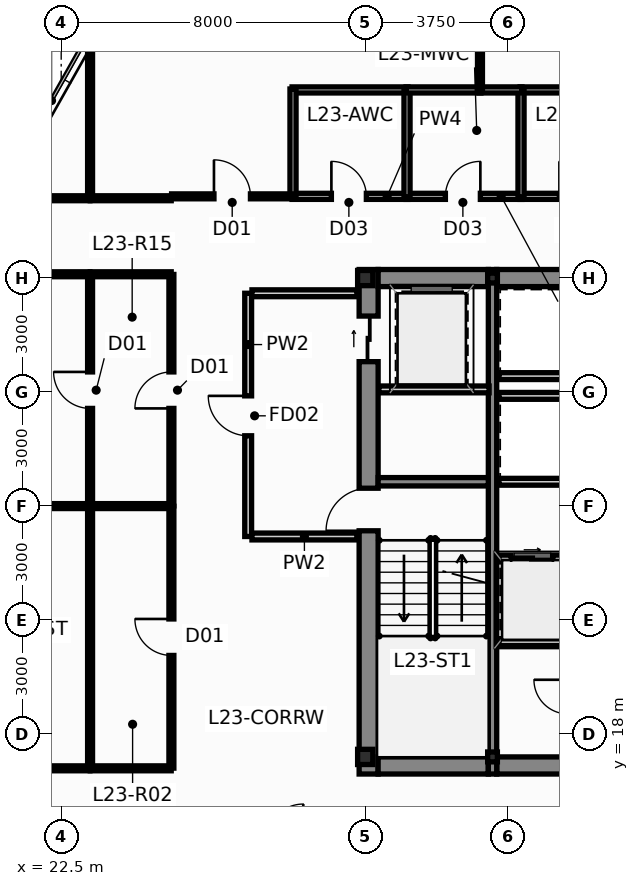
"""IFC4 building model, lengths in metres.
Left out: names, types, materials, properties, quantities, classifications, styles, units other than length and angle.
Written with IfcOpenShell. Run it as: python <this file> out.ifc"""

import sys

from ifc_helpers import new_model, si_unit, direction, frame, frame_2d, origin, origin_2d, place, context, subcontext, project, spatial, rectangle, i_section, extrude, source, transform, mapped, element, fill, save


model = new_model("IFC4")
c1 = context("Model", 3, precision=1e-05, world=origin(), true_north=direction((0.0, 1.0)))
c2 = subcontext(c1, "Body", "Model", "MODEL_VIEW")
j1 = project(units=[si_unit("LENGTHUNIT", "METRE"), si_unit("PLANEANGLEUNIT", "RADIAN")], contexts=[c1])
p1 = place(None, origin())
s1 = spatial("IfcSite", under=j1, at=p1, CompositionType="ELEMENT")
p2 = place(p1, origin())
s2 = spatial("IfcBuilding", under=s1, at=p2, CompositionType="ELEMENT")
p3 = place(p2, frame((0.0, 0.0, 90.8)))
s3 = spatial("IfcBuildingStorey", under=s2, at=p3, CompositionType="ELEMENT", Elevation=90.8)
m1 = source(origin(), c2, "Body", "SweptSolid", [
    extrude(i_section(OverallWidth=0.4, OverallDepth=0.4, WebThickness=0.02, FlangeThickness=0.032, at=origin_2d()), origin(), (0.0, 0.0, 1.0), 3.65),
])
for number, where, z_axis, x_axis in (
    (1, (30.5, 17.4, 0.0), (0.0, 0.0, 1.0), (1.0, 0.0, 0.0)),
    (2, (30.5, 30.0, 0.0), (0.0, 0.0, 1.0), (1.0, 0.0, 0.0)),
):
    element("IfcColumn", number, at=place(p3, frame(where, z_axis=z_axis, x_axis=x_axis)), inside=s3, PredefinedType="COLUMN", context=c2, shape_type="MappedRepresentation", body=[
        mapped(m1, transform((0.0, 0.0, 0.0), scale=1.0)),
    ])
m2 = source(origin(), c2, "Body", "SweptSolid", [
    extrude(i_section(OverallWidth=0.256, OverallDepth=0.26, WebThickness=0.01, FlangeThickness=0.017, at=origin_2d()), origin(), (0.0, 0.0, 1.0), 3.65),
])
for number, where, z_axis, x_axis in (
    (3, (33.85, 17.4, 0.0), (0.0, 0.0, 1.0), (1.0, 0.0, 0.0)),
    (4, (33.85, 30.0, 0.0), (0.0, 0.0, 1.0), (1.0, 0.0, 0.0)),
):
    element("IfcColumn", number, at=place(p3, frame(where, z_axis=z_axis, x_axis=x_axis)), inside=s3, PredefinedType="COLUMN", context=c2, shape_type="MappedRepresentation", body=[
        mapped(m2, transform((0.0, 0.0, 0.0), scale=1.0)),
    ])
p4 = place(p3, frame((30.59, 16.95, 0.0), z_axis=(0.0, 0.0, 1.0), x_axis=(0.0, 1.0, 0.0)))
e5 = element("IfcWall", 5, at=p4, inside=s3, PredefinedType="SHEAR", context=c2, shape_type="SweptSolid", body=[
    extrude(rectangle(XDim=13.275, YDim=0.5, at=frame_2d((6.638, 0.0))), origin(), (0.0, 0.0, 1.0), 3.65),
])
p5 = place(p4, frame((6.4, 0.0, 0.0)))
e6 = element("IfcOpeningElement", 6, at=p5, cuts=e5, PredefinedType="OPENING", context=c2, shape_type="SweptSolid", body=[
    extrude(rectangle(XDim=1.12, YDim=2.15, at=frame_2d((0.56, 1.075))), frame((0.0, 0.262, 0.0), z_axis=(0.0, -1.0, 0.0), x_axis=(1.0, 0.0, 0.0)), (0.0, 0.0, 1.0), 0.524),
])
p6 = place(p4, frame((10.85, 0.0, 0.0)))
e7 = element("IfcOpeningElement", 7, at=p6, cuts=e5, PredefinedType="OPENING", context=c2, shape_type="SweptSolid", body=[
    extrude(rectangle(XDim=1.2, YDim=2.2, at=frame_2d((0.6, 1.1))), frame((0.0, 0.262, 0.0), z_axis=(0.0, -1.0, 0.0), x_axis=(1.0, 0.0, 0.0)), (0.0, 0.0, 1.0), 0.524),
])
p7 = place(p3, frame((30.84, 17.175, 0.0), z_axis=(0.0, 0.0, 1.0), x_axis=(1.0, 0.0, 0.0)))
e8 = element("IfcWall", 8, at=p7, inside=s3, PredefinedType="SHEAR", context=c2, shape_type="SweptSolid", body=[
    extrude(rectangle(XDim=2.9, YDim=0.45, at=frame_2d((1.45, 0.0))), origin(), (0.0, 0.0, 1.0), 3.65),
])
p8 = place(p3, frame((33.96, 17.175, 0.0), z_axis=(0.0, 0.0, 1.0), x_axis=(1.0, 0.0, 0.0)))
e9 = element("IfcWall", 9, at=p8, inside=s3, PredefinedType="SHEAR", context=c2, shape_type="SweptSolid", body=[
    extrude(rectangle(XDim=8.08, YDim=0.45, at=frame_2d((4.04, 0.0))), origin(), (0.0, 0.0, 1.0), 3.65),
])
p9 = place(p3, frame((30.84, 30.0, 0.0), z_axis=(0.0, 0.0, 1.0), x_axis=(1.0, 0.0, 0.0)))
e10 = element("IfcWall", 10, at=p9, inside=s3, PredefinedType="SHEAR", context=c2, shape_type="SweptSolid", body=[
    extrude(rectangle(XDim=2.9, YDim=0.45, at=frame_2d((1.45, 0.0))), origin(), (0.0, 0.0, 1.0), 3.65),
])
p10 = place(p3, frame((33.96, 30.0, 0.0), z_axis=(0.0, 0.0, 1.0), x_axis=(1.0, 0.0, 0.0)))
e11 = element("IfcWall", 11, at=p10, inside=s3, PredefinedType="SHEAR", context=c2, shape_type="SweptSolid", body=[
    extrude(rectangle(XDim=3.78, YDim=0.45, at=frame_2d((1.89, 0.0))), origin(), (0.0, 0.0, 1.0), 3.65),
])
p11 = place(p3, frame((33.85, 16.95, 0.0), z_axis=(0.0, 0.0, 1.0), x_axis=(0.0, 1.0, 0.0)))
e12 = element("IfcWall", 12, at=p11, inside=s3, PredefinedType="SHEAR", context=c2, shape_type="SweptSolid", body=[
    extrude(rectangle(XDim=13.275, YDim=0.22, at=frame_2d((6.638, 0.0))), origin(), (0.0, 0.0, 1.0), 3.65),
])
p12 = place(p3, frame((30.84, 24.64, 0.0), z_axis=(0.0, 0.0, 1.0), x_axis=(1.0, 0.0, 0.0)))
e13 = element("IfcWall", 13, at=p12, inside=s3, PredefinedType="SHEAR", context=c2, shape_type="SweptSolid", body=[
    extrude(rectangle(XDim=2.9, YDim=0.22, at=frame_2d((1.45, 0.0))), origin(), (0.0, 0.0, 1.0), 3.65),
])
p13 = place(p3, frame((34.02, 22.62, 0.0), z_axis=(0.0, 0.0, 1.0), x_axis=(1.0, 0.0, 0.0)))
e14 = element("IfcWall", 14, at=p13, inside=s3, PredefinedType="PARTITIONING", context=c2, shape_type="SweptSolid", body=[
    extrude(rectangle(XDim=3.6, YDim=0.18, at=frame_2d((1.8, 0.0))), origin(), (0.0, 0.0, 1.0), 3.4),
])
p14 = place(p13, frame((0.32, 0.0, 0.0)))
e15 = element("IfcOpeningElement", 15, at=p14, cuts=e14, PredefinedType="OPENING", context=c2, shape_type="SweptSolid", body=[
    extrude(rectangle(XDim=1.1, YDim=2.2, at=frame_2d((0.55, 1.1))), frame((0.0, 0.102, 0.0), z_axis=(0.0, -1.0, 0.0), x_axis=(1.0, 0.0, 0.0)), (0.0, 0.0, 1.0), 0.204),
])
p15 = place(p13, frame((2.12, 0.0, 0.0)))
e16 = element("IfcOpeningElement", 16, at=p15, cuts=e14, PredefinedType="OPENING", context=c2, shape_type="SweptSolid", body=[
    extrude(rectangle(XDim=1.1, YDim=2.2, at=frame_2d((0.55, 1.1))), frame((0.0, 0.102, 0.0), z_axis=(0.0, -1.0, 0.0), x_axis=(1.0, 0.0, 0.0)), (0.0, 0.0, 1.0), 0.204),
])
p16 = place(p3, frame((34.02, 26.9, 0.0), z_axis=(0.0, 0.0, 1.0), x_axis=(1.0, 0.0, 0.0)))
e17 = element("IfcWall", 17, at=p16, inside=s3, PredefinedType="PARTITIONING", context=c2, shape_type="SweptSolid", body=[
    extrude(rectangle(XDim=3.6, YDim=0.18, at=frame_2d((1.8, 0.0))), origin(), (0.0, 0.0, 1.0), 3.4),
])
p17 = place(p3, frame((34.02, 24.64, 0.0), z_axis=(0.0, 0.0, 1.0), x_axis=(1.0, 0.0, 0.0)))
e18 = element("IfcWall", 18, at=p17, inside=s3, PredefinedType="PARTITIONING", context=c2, shape_type="SweptSolid", body=[
    extrude(rectangle(XDim=3.68, YDim=0.18, at=frame_2d((1.84, 0.0))), origin(), (0.0, 0.0, 1.0), 3.4),
])
p18 = place(p3, frame((34.02, 27.42, 0.0), z_axis=(0.0, 0.0, 1.0), x_axis=(1.0, 0.0, 0.0)))
e19 = element("IfcWall", 19, at=p18, inside=s3, PredefinedType="PARTITIONING", context=c2, shape_type="SweptSolid", body=[
    extrude(rectangle(XDim=3.66, YDim=0.18, at=frame_2d((1.83, 0.0))), origin(), (0.0, 0.0, 1.0), 3.4),
])
p19 = place(p3, frame((27.42, 23.2, 0.0), z_axis=(0.0, 0.0, 1.0), x_axis=(0.0, 1.0, 0.0)))
e20 = element("IfcWall", 20, at=p19, inside=s3, PredefinedType="PARTITIONING", context=c2, shape_type="SweptSolid", body=[
    extrude(rectangle(XDim=6.4, YDim=0.18, at=frame_2d((3.2, 0.0))), origin(), (0.0, 0.0, 1.0), 3.026),
])
p20 = place(p19, frame((2.65, 0.0, 0.0)))
e21 = element("IfcOpeningElement", 21, at=p20, cuts=e20, PredefinedType="OPENING", context=c2, shape_type="SweptSolid", body=[
    extrude(rectangle(XDim=1.05, YDim=2.15, at=frame_2d((0.525, 1.075))), frame((0.0, 0.102, 0.0), z_axis=(0.0, -1.0, 0.0), x_axis=(1.0, 0.0, 0.0)), (0.0, 0.0, 1.0), 0.204),
])
p21 = place(p3, frame((27.52, 23.2, 0.0), z_axis=(0.0, 0.0, 1.0), x_axis=(1.0, 0.0, 0.0)))
e22 = element("IfcWall", 22, at=p21, inside=s3, PredefinedType="PARTITIONING", context=c2, shape_type="SweptSolid", body=[
    extrude(rectangle(XDim=2.76, YDim=0.18, at=frame_2d((1.38, 0.0))), origin(), (0.0, 0.0, 1.0), 3.4),
])
p22 = place(p3, frame((27.52, 29.6, 0.0), z_axis=(0.0, 0.0, 1.0), x_axis=(1.0, 0.0, 0.0)))
e23 = element("IfcWall", 23, at=p22, inside=s3, PredefinedType="PARTITIONING", context=c2, shape_type="SweptSolid", body=[
    extrude(rectangle(XDim=2.76, YDim=0.18, at=frame_2d((1.38, 0.0))), origin(), (0.0, 0.0, 1.0), 2.783),
])
p23 = place(p3, frame((30.86, 27.07, 0.0), z_axis=(0.0, 0.0, 1.0), x_axis=(1.0, 0.0, 0.0)))
e24 = element("IfcWall", 24, at=p23, inside=s3, PredefinedType="PARTITIONING", context=c2, shape_type="SweptSolid", body=[
    extrude(rectangle(XDim=2.9, YDim=0.18, at=frame_2d((1.45, 0.0))), origin(), (0.0, 0.0, 1.0), 3.4),
])
p24 = place(p3, frame((34.02, 20.42, 0.0), z_axis=(0.0, 0.0, 1.0), x_axis=(1.0, 0.0, 0.0)))
e25 = element("IfcWall", 25, at=p24, inside=s3, PredefinedType="PARTITIONING", context=c2, shape_type="SweptSolid", body=[
    extrude(rectangle(XDim=3.64, YDim=0.18, at=frame_2d((1.82, 0.0))), origin(), (0.0, 0.0, 1.0), 3.4),
])
p25 = place(p3, frame((28.575, 32.15, 0.0), z_axis=(0.0, 0.0, 1.0), x_axis=(1.0, 0.0, 0.0)))
e26 = element("IfcWall", 26, at=p25, inside=s3, PredefinedType="PLUMBINGWALL", context=c2, shape_type="SweptSolid", body=[
    extrude(rectangle(XDim=3.05, YDim=0.16, at=frame_2d((1.525, 0.0))), origin(), (0.0, 0.0, 1.0), 3.026),
])
p26 = place(p25, frame((1.035, 0.0, 0.0)))
e27 = element("IfcOpeningElement", 27, at=p26, cuts=e26, PredefinedType="OPENING", context=c2, shape_type="SweptSolid", body=[
    extrude(rectangle(XDim=0.92, YDim=2.1, at=frame_2d((0.46, 1.05))), frame((0.0, 0.092, 0.0), z_axis=(0.0, -1.0, 0.0), x_axis=(1.0, 0.0, 0.0)), (0.0, 0.0, 1.0), 0.184),
])
p27 = place(p3, frame((31.575, 32.15, 0.0), z_axis=(0.0, 0.0, 1.0), x_axis=(1.0, 0.0, 0.0)))
e28 = element("IfcWall", 28, at=p27, inside=s3, PredefinedType="PLUMBINGWALL", context=c2, shape_type="SweptSolid", body=[
    extrude(rectangle(XDim=3.05, YDim=0.16, at=frame_2d((1.525, 0.0))), origin(), (0.0, 0.0, 1.0), 3.026),
])
p28 = place(p27, frame((1.035, 0.0, 0.0)))
e29 = element("IfcOpeningElement", 29, at=p28, cuts=e28, PredefinedType="OPENING", context=c2, shape_type="SweptSolid", body=[
    extrude(rectangle(XDim=0.92, YDim=2.1, at=frame_2d((0.46, 1.05))), frame((0.0, 0.092, 0.0), z_axis=(0.0, -1.0, 0.0), x_axis=(1.0, 0.0, 0.0)), (0.0, 0.0, 1.0), 0.184),
])
p29 = place(p3, frame((34.575, 32.15, 0.0), z_axis=(0.0, 0.0, 1.0), x_axis=(1.0, 0.0, 0.0)))
e30 = element("IfcWall", 30, at=p29, inside=s3, PredefinedType="PLUMBINGWALL", context=c2, shape_type="SweptSolid", body=[
    extrude(rectangle(XDim=3.05, YDim=0.16, at=frame_2d((1.525, 0.0))), origin(), (0.0, 0.0, 1.0), 3.026),
])
p30 = place(p29, frame((1.035, 0.0, 0.0)))
e31 = element("IfcOpeningElement", 31, at=p30, cuts=e30, PredefinedType="OPENING", context=c2, shape_type="SweptSolid", body=[
    extrude(rectangle(XDim=0.92, YDim=2.1, at=frame_2d((0.46, 1.05))), frame((0.0, 0.092, 0.0), z_axis=(0.0, -1.0, 0.0), x_axis=(1.0, 0.0, 0.0)), (0.0, 0.0, 1.0), 0.184),
])
for number, where, z_axis, x_axis in (
    (32, (28.575, 34.95, 0.0), (0.0, 0.0, 1.0), (1.0, 0.0, 0.0)),
    (33, (37.625, 34.95, 0.0), (0.0, 0.0, 1.0), (-1.0, 0.0, 0.0)),
):
    element("IfcWall", number, at=place(p3, frame(where, z_axis=z_axis, x_axis=x_axis)), inside=s3, PredefinedType="PLUMBINGWALL", context=c2, shape_type="SweptSolid", body=[
        extrude(rectangle(XDim=3.05, YDim=0.16, at=frame_2d((1.525, 0.0))), origin(), (0.0, 0.0, 1.0), 3.026),
    ])
for number, where, z_axis, x_axis in (
    (34, (31.6, 32.125, 0.0), (0.0, 0.0, 1.0), (0.0, 1.0, 0.0)),
    (35, (28.6, 32.125, 0.0), (0.0, 0.0, 1.0), (0.0, 1.0, 0.0)),
    (36, (34.6, 32.125, 0.0), (0.0, 0.0, 1.0), (0.0, 1.0, 0.0)),
):
    element("IfcWall", number, at=place(p3, frame(where, z_axis=z_axis, x_axis=x_axis)), inside=s3, PredefinedType="PLUMBINGWALL", context=c2, shape_type="SweptSolid", body=[
        extrude(rectangle(XDim=2.85, YDim=0.16, at=frame_2d((1.425, 0.0))), origin(), (0.0, 0.0, 1.0), 3.4),
    ])
p31 = place(p3, frame((31.575, 34.95, 0.0), z_axis=(0.0, 0.0, 1.0), x_axis=(1.0, 0.0, 0.0)))
e37 = element("IfcWall", 37, at=p31, inside=s3, PredefinedType="PLUMBINGWALL", context=c2, shape_type="SweptSolid", body=[
    extrude(rectangle(XDim=1.97, YDim=0.16, at=frame_2d((0.985, 0.0))), origin(), (0.0, 0.0, 1.0), 3.026),
])
p32 = place(p3, frame((33.495, 34.95, 0.0), z_axis=(0.0, 0.0, 1.0), x_axis=(1.0, 0.0, 0.0)))
e38 = element("IfcWall", 38, at=p32, inside=s3, PredefinedType="PLUMBINGWALL", context=c2, shape_type="SweptSolid", body=[
    extrude(rectangle(XDim=1.13, YDim=0.16, at=frame_2d((0.565, 0.0))), origin(), (0.0, 0.0, 1.0), 3.026),
])
p33 = place(p3, frame((33.52, 34.955, 0.0), z_axis=(0.0, 0.0, 1.0), x_axis=(0.0, 1.0, 0.0)))
e39 = element("IfcWall", 39, at=p33, inside=s3, PredefinedType="PARTITIONING", context=c2, shape_type="SweptSolid", body=[
    extrude(rectangle(XDim=16.007, YDim=0.13, at=frame_2d((8.003, 0.0))), origin(), (0.0, 0.0, 1.0), 3.4),
])
p34 = place(p3, frame((13.764, 17.1, 0.0), z_axis=(0.0, 0.0, 1.0), x_axis=(1.0, 0.0, 0.0)))
e40 = element("IfcWall", 40, at=p34, inside=s3, PredefinedType="PARTITIONING", context=c2, shape_type="SweptSolid", body=[
    extrude(rectangle(XDim=9.491, YDim=0.13, at=frame_2d((4.745, 0.0))), origin(), (0.0, 0.0, 1.0), 3.4),
])
p35 = place(p34, frame((4.322, 0.0, 0.0)))
e41 = element("IfcOpeningElement", 41, at=p35, cuts=e40, PredefinedType="OPENING", context=c2, shape_type="SweptSolid", body=[
    extrude(rectangle(XDim=0.96, YDim=2.15, at=frame_2d((0.48, 1.075))), frame((0.0, 0.077, 0.0), z_axis=(0.0, -1.0, 0.0), x_axis=(1.0, 0.0, 0.0)), (0.0, 0.0, 1.0), 0.154),
])
p36 = place(p3, frame((16.341, 24.0, 0.0), z_axis=(0.0, 0.0, 1.0), x_axis=(1.0, 0.0, 0.0)))
e42 = element("IfcWall", 42, at=p36, inside=s3, PredefinedType="PARTITIONING", context=c2, shape_type="SweptSolid", body=[
    extrude(rectangle(XDim=6.914, YDim=0.13, at=frame_2d((3.457, 0.0))), origin(), (0.0, 0.0, 1.0), 3.4),
])
p37 = place(p3, frame((25.4, 17.105, 0.0), z_axis=(0.0, 0.0, 1.0), x_axis=(0.0, 1.0, 0.0)))
e43 = element("IfcWall", 43, at=p37, inside=s3, PredefinedType="PARTITIONING", context=c2, shape_type="SweptSolid", body=[
    extrude(rectangle(XDim=6.89, YDim=0.13, at=frame_2d((3.445, 0.0))), origin(), (0.0, 0.0, 1.0), 3.026),
])
p38 = place(p37, frame((2.965, 0.0, 0.0)))
e44 = element("IfcOpeningElement", 44, at=p38, cuts=e43, PredefinedType="OPENING", context=c2, shape_type="SweptSolid", body=[
    extrude(rectangle(XDim=0.96, YDim=2.15, at=frame_2d((0.48, 1.075))), frame((0.0, 0.077, 0.0), z_axis=(0.0, -1.0, 0.0), x_axis=(1.0, 0.0, 0.0)), (0.0, 0.0, 1.0), 0.154),
])
p39 = place(p3, frame((23.26, 17.105, 0.0), z_axis=(0.0, 0.0, 1.0), x_axis=(0.0, 1.0, 0.0)))
e45 = element("IfcWall", 45, at=p39, inside=s3, PredefinedType="PARTITIONING", context=c2, shape_type="SweptSolid", body=[
    extrude(rectangle(XDim=6.89, YDim=0.13, at=frame_2d((3.445, 0.0))), origin(), (0.0, 0.0, 1.0), 3.026),
])
p40 = place(p3, frame((25.4, 24.005, 0.0), z_axis=(0.0, 0.0, 1.0), x_axis=(0.0, 1.0, 0.0)))
e46 = element("IfcWall", 46, at=p40, inside=s3, PredefinedType="PARTITIONING", context=c2, shape_type="SweptSolid", body=[
    extrude(rectangle(XDim=6.09, YDim=0.13, at=frame_2d((3.045, 0.0))), origin(), (0.0, 0.0, 1.0), 3.026),
])
p41 = place(p40, frame((2.565, 0.0, 0.0)))
e47 = element("IfcOpeningElement", 47, at=p41, cuts=e46, PredefinedType="OPENING", context=c2, shape_type="SweptSolid", body=[
    extrude(rectangle(XDim=0.96, YDim=2.15, at=frame_2d((0.48, 1.075))), frame((0.0, 0.077, 0.0), z_axis=(0.0, -1.0, 0.0), x_axis=(1.0, 0.0, 0.0)), (0.0, 0.0, 1.0), 0.154),
])
p42 = place(p3, frame((23.26, 24.005, 0.0), z_axis=(0.0, 0.0, 1.0), x_axis=(0.0, 1.0, 0.0)))
e48 = element("IfcWall", 48, at=p42, inside=s3, PredefinedType="PARTITIONING", context=c2, shape_type="SweptSolid", body=[
    extrude(rectangle(XDim=6.09, YDim=0.13, at=frame_2d((3.045, 0.0))), origin(), (0.0, 0.0, 1.0), 3.026),
])
p43 = place(p42, frame((2.565, 0.0, 0.0)))
e49 = element("IfcOpeningElement", 49, at=p43, cuts=e48, PredefinedType="OPENING", context=c2, shape_type="SweptSolid", body=[
    extrude(rectangle(XDim=0.96, YDim=2.15, at=frame_2d((0.48, 1.075))), frame((0.0, 0.077, 0.0), z_axis=(0.0, -1.0, 0.0), x_axis=(1.0, 0.0, 0.0)), (0.0, 0.0, 1.0), 0.154),
])
p44 = place(p3, frame((23.26, 32.105, 0.0), z_axis=(0.0, 0.0, 1.0), x_axis=(0.0, 1.0, 0.0)))
e50 = element("IfcWall", 50, at=p44, inside=s3, PredefinedType="PARTITIONING", context=c2, shape_type="SweptSolid", body=[
    extrude(rectangle(XDim=4.146, YDim=0.13, at=frame_2d((2.073, 0.0))), origin(), (0.0, 0.0, 1.0), 3.4),
])
p45 = place(p3, frame((19.786, 30.1, 0.0), z_axis=(0.0, 0.0, 1.0), x_axis=(1.0, 0.0, 0.0)))
e51 = element("IfcWall", 51, at=p45, inside=s3, PredefinedType="PARTITIONING", context=c2, shape_type="SweptSolid", body=[
    extrude(rectangle(XDim=3.469, YDim=0.13, at=frame_2d((1.734, 0.0))), origin(), (0.0, 0.0, 1.0), 3.4),
])
p46 = place(p3, frame((25.405, 32.15, 0.0), z_axis=(0.0, 0.0, 1.0), x_axis=(1.0, 0.0, 0.0)))
e52 = element("IfcWall", 52, at=p46, inside=s3, PredefinedType="PARTITIONING", context=c2, shape_type="SweptSolid", body=[
    extrude(rectangle(XDim=3.19, YDim=0.13, at=frame_2d((1.595, 0.0))), origin(), (0.0, 0.0, 1.0), 3.4),
])
p47 = place(p46, frame((1.115, 0.0, 0.0)))
e53 = element("IfcOpeningElement", 53, at=p47, cuts=e52, PredefinedType="OPENING", context=c2, shape_type="SweptSolid", body=[
    extrude(rectangle(XDim=0.96, YDim=2.15, at=frame_2d((0.48, 1.075))), frame((0.0, 0.077, 0.0), z_axis=(0.0, -1.0, 0.0), x_axis=(1.0, 0.0, 0.0)), (0.0, 0.0, 1.0), 0.154),
])
p48 = place(p3, frame((20.916, 32.1, 0.0), z_axis=(0.0, 0.0, 1.0), x_axis=(1.0, 0.0, 0.0)))
e54 = element("IfcWall", 54, at=p48, inside=s3, PredefinedType="PARTITIONING", context=c2, shape_type="SweptSolid", body=[
    extrude(rectangle(XDim=2.339, YDim=0.13, at=frame_2d((1.17, 0.0))), origin(), (0.0, 0.0, 1.0), 3.4),
])
for number, where, z_axis, x_axis in (
    (55, (23.265, 17.1, 0.0), (0.0, 0.0, 1.0), (1.0, 0.0, 0.0)),
    (56, (25.395, 30.1, 0.0), (0.0, 0.0, 1.0), (-1.0, 0.0, 0.0)),
    (57, (23.265, 32.1, 0.0), (0.0, 0.0, 1.0), (1.0, 0.0, 0.0)),
    (58, (23.265, 24.0, 0.0), (0.0, 0.0, 1.0), (1.0, 0.0, 0.0)),
):
    element("IfcWall", number, at=place(p3, frame(where, z_axis=z_axis, x_axis=x_axis)), inside=s3, PredefinedType="PARTITIONING", context=c2, shape_type="SweptSolid", body=[
        extrude(rectangle(XDim=2.13, YDim=0.13, at=frame_2d((1.065, 0.0))), origin(), (0.0, 0.0, 1.0), 3.4),
    ])
p49 = place(p5, origin())
e59 = element("IfcDoor", 59, at=p49, inside=s3, OperationType="SINGLE_SWING_LEFT", PredefinedType="DOOR", context=c2, shape_type="SweptSolid", body=[
    extrude(rectangle(XDim=1.12, YDim=2.15, at=frame_2d((0.56, 1.075))), frame((0.0, 0.025, 0.0), z_axis=(0.0, -1.0, 0.0), x_axis=(1.0, 0.0, 0.0)), (0.0, 0.0, 1.0), 0.05),
])
fill(e6, e59)
p50 = place(p6, origin())
e60 = element("IfcDoor", 60, at=p50, inside=s3, OperationType="SLIDING_TO_LEFT", PredefinedType="DOOR", context=c2, shape_type="SweptSolid", body=[
    extrude(rectangle(XDim=1.2, YDim=2.2, at=frame_2d((0.6, 1.1))), frame((0.0, 0.025, 0.0), z_axis=(0.0, -1.0, 0.0), x_axis=(1.0, 0.0, 0.0)), (0.0, 0.0, 1.0), 0.05),
])
fill(e7, e60)
p51 = place(p14, origin())
e61 = element("IfcDoor", 61, at=p51, inside=s3, OperationType="SLIDING_TO_LEFT", PredefinedType="DOOR", context=c2, shape_type="SweptSolid", body=[
    extrude(rectangle(XDim=1.1, YDim=2.2, at=frame_2d((0.55, 1.1))), frame((0.0, 0.025, 0.0), z_axis=(0.0, -1.0, 0.0), x_axis=(1.0, 0.0, 0.0)), (0.0, 0.0, 1.0), 0.05),
])
fill(e15, e61)
p52 = place(p20, origin())
e62 = element("IfcDoor", 62, at=p52, inside=s3, OperationType="SINGLE_SWING_RIGHT", PredefinedType="DOOR", context=c2, shape_type="SweptSolid", body=[
    extrude(rectangle(XDim=1.05, YDim=2.15, at=frame_2d((0.525, 1.075))), frame((0.0, 0.025, 0.0), z_axis=(0.0, -1.0, 0.0), x_axis=(1.0, 0.0, 0.0)), (0.0, 0.0, 1.0), 0.05),
])
fill(e21, e62)
p53 = place(p26, origin())
e63 = element("IfcDoor", 63, at=p53, inside=s3, OperationType="SINGLE_SWING_LEFT", PredefinedType="DOOR", context=c2, shape_type="SweptSolid", body=[
    extrude(rectangle(XDim=0.92, YDim=2.1, at=frame_2d((0.46, 1.05))), frame((0.0, 0.025, 0.0), z_axis=(0.0, -1.0, 0.0), x_axis=(1.0, 0.0, 0.0)), (0.0, 0.0, 1.0), 0.05),
])
fill(e27, e63)
p54 = place(p28, origin())
e64 = element("IfcDoor", 64, at=p54, inside=s3, OperationType="SINGLE_SWING_RIGHT", PredefinedType="DOOR", context=c2, shape_type="SweptSolid", body=[
    extrude(rectangle(XDim=0.92, YDim=2.1, at=frame_2d((0.46, 1.05))), frame((0.0, 0.025, 0.0), z_axis=(0.0, -1.0, 0.0), x_axis=(1.0, 0.0, 0.0)), (0.0, 0.0, 1.0), 0.05),
])
fill(e29, e64)
p55 = place(p38, origin())
e65 = element("IfcDoor", 65, at=p55, inside=s3, OperationType="SINGLE_SWING_RIGHT", PredefinedType="DOOR", context=c2, shape_type="SweptSolid", body=[
    extrude(rectangle(XDim=0.96, YDim=2.15, at=frame_2d((0.48, 1.075))), frame((0.0, 0.025, 0.0), z_axis=(0.0, -1.0, 0.0), x_axis=(1.0, 0.0, 0.0)), (0.0, 0.0, 1.0), 0.05),
])
fill(e44, e65)
p56 = place(p41, origin())
e66 = element("IfcDoor", 66, at=p56, inside=s3, OperationType="SINGLE_SWING_LEFT", PredefinedType="DOOR", context=c2, shape_type="SweptSolid", body=[
    extrude(rectangle(XDim=0.96, YDim=2.15, at=frame_2d((0.48, 1.075))), frame((0.0, 0.025, 0.0), z_axis=(0.0, -1.0, 0.0), x_axis=(1.0, 0.0, 0.0)), (0.0, 0.0, 1.0), 0.05),
])
fill(e47, e66)
p57 = place(p43, origin())
e67 = element("IfcDoor", 67, at=p57, inside=s3, OperationType="SINGLE_SWING_RIGHT", PredefinedType="DOOR", context=c2, shape_type="SweptSolid", body=[
    extrude(rectangle(XDim=0.96, YDim=2.15, at=frame_2d((0.48, 1.075))), frame((0.0, 0.025, 0.0), z_axis=(0.0, -1.0, 0.0), x_axis=(1.0, 0.0, 0.0)), (0.0, 0.0, 1.0), 0.05),
])
fill(e49, e67)
p58 = place(p47, origin())
e68 = element("IfcDoor", 68, at=p58, inside=s3, OperationType="SINGLE_SWING_LEFT", PredefinedType="DOOR", context=c2, shape_type="SweptSolid", body=[
    extrude(rectangle(XDim=0.96, YDim=2.15, at=frame_2d((0.48, 1.075))), frame((0.0, 0.025, 0.0), z_axis=(0.0, -1.0, 0.0), x_axis=(1.0, 0.0, 0.0)), (0.0, 0.0, 1.0), 0.05),
])
fill(e53, e68)
save(model, sys.argv[1])
